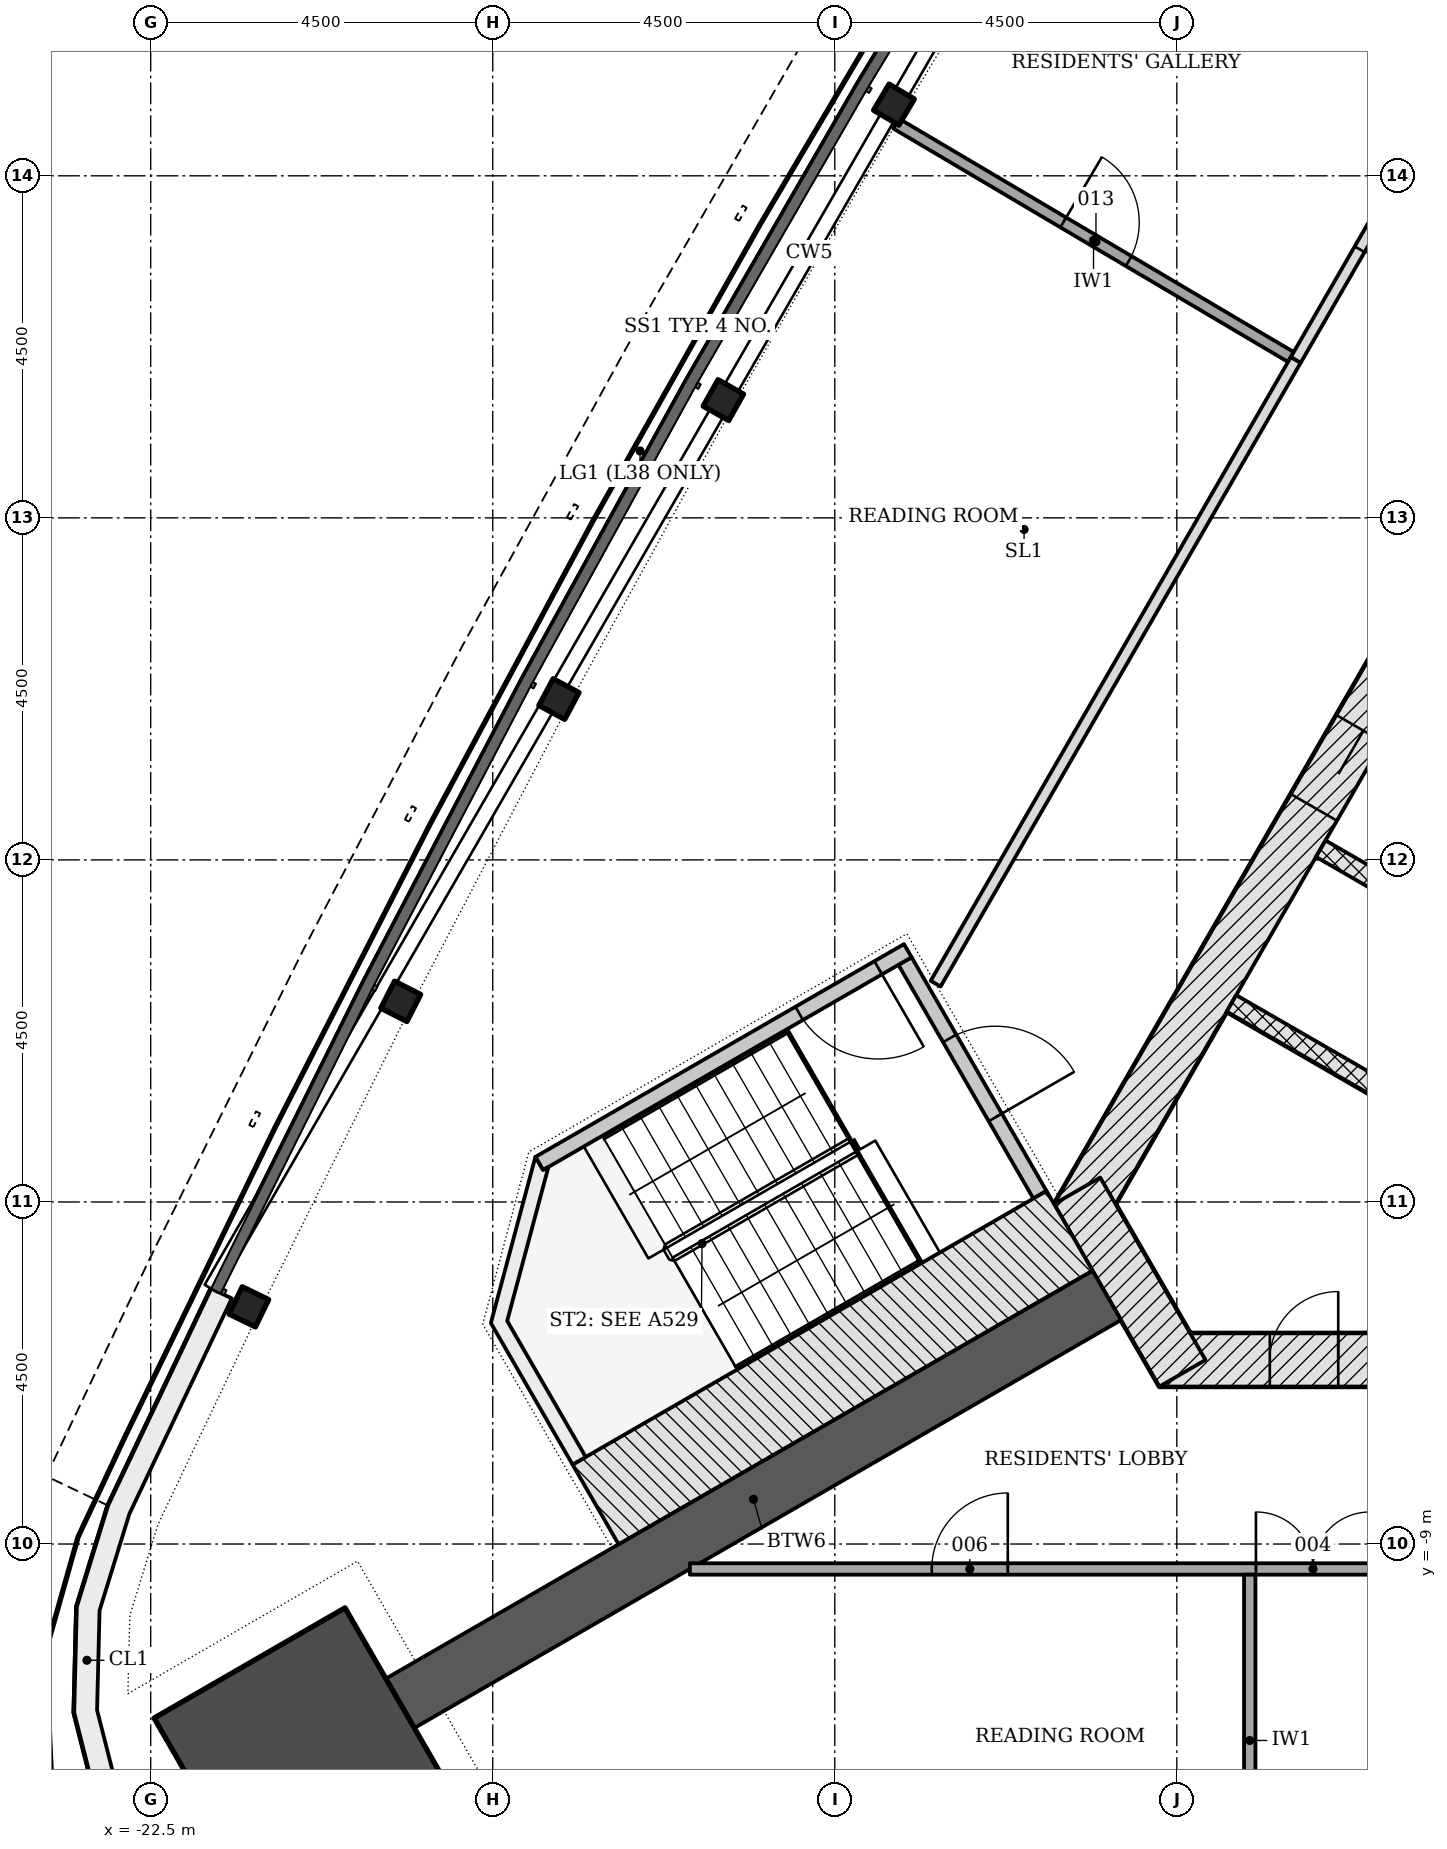
"""IFC4 building model, lengths in metres.
Left out: names, types, materials, properties, quantities, classifications, styles, units other than length and angle.
Written with IfcOpenShell. Run it as: python <this file> out.ifc"""

import sys

from ifc_helpers import new_model, si_unit, direction, frame, frame_2d, origin, origin_2d, place, context, subcontext, project, spatial, polyline, rectangle, i_section, outline, extrude, element, fill, save


model = new_model("IFC4")
c1 = context("Model", 3, precision=1e-05, world=origin(), true_north=direction((0.0, 1.0)))
c2 = subcontext(c1, "Body", "Model", "MODEL_VIEW")
j1 = project(units=[si_unit("LENGTHUNIT", "METRE"), si_unit("PLANEANGLEUNIT", "RADIAN")], contexts=[c1])
p1 = place(None, origin())
s1 = spatial("IfcSite", under=j1, at=p1, CompositionType="ELEMENT")
p2 = place(p1, origin())
s2 = spatial("IfcBuilding", under=s1, at=p2, CompositionType="ELEMENT")
p3 = place(p2, frame((0.0, 0.0, 150.9)))
s3 = spatial("IfcBuildingStorey", under=s2, at=p3, CompositionType="ELEMENT", Elevation=150.9)
p4 = place(p3, frame((-9.229, -6.578, -0.2), z_axis=(0.0, 0.0, 1.0), x_axis=(1.0, 0.0, 0.0)))
e1 = element("IfcWall", 1, at=p4, inside=s3, PredefinedType="SHEAR", context=c2, shape_type="SweptSolid", body=[
    extrude(rectangle(XDim=18.458, YDim=0.7, at=frame_2d((9.229, 0.0))), origin(), (0.0, 0.0, 1.0), 3.6),
])
p5 = place(p4, frame((6.7, 0.0, 0.2)))
e2 = element("IfcOpeningElement", 2, at=p5, cuts=e1, PredefinedType="OPENING", context=c2, shape_type="SweptSolid", body=[
    extrude(rectangle(XDim=1.0, YDim=2.1, at=frame_2d((0.5, 1.05))), frame((0.0, 0.36, 0.0), z_axis=(0.0, -1.0, 0.0), x_axis=(1.0, 0.0, 0.0)), (0.0, 0.0, 1.0), 0.72),
])
p6 = place(p4, frame((1.452, 0.0, 0.2)))
e3 = element("IfcOpeningElement", 3, at=p6, cuts=e1, PredefinedType="OPENING", context=c2, shape_type="SweptSolid", body=[
    extrude(rectangle(XDim=0.9, YDim=2.1, at=frame_2d((0.45, 1.05))), frame((0.0, 0.36, 0.0), z_axis=(0.0, -1.0, 0.0), x_axis=(1.0, 0.0, 0.0)), (0.0, 0.0, 1.0), 0.72),
])
p7 = place(p4, frame((4.45, 0.0, 0.2)))
e4 = element("IfcOpeningElement", 4, at=p7, cuts=e1, PredefinedType="OPENING", context=c2, shape_type="SweptSolid", body=[
    extrude(rectangle(XDim=1.0, YDim=2.1, at=frame_2d((0.5, 1.05))), frame((0.0, 0.36, 0.0), z_axis=(0.0, -1.0, 0.0), x_axis=(1.0, 0.0, 0.0)), (0.0, 0.0, 1.0), 0.72),
])
p8 = place(p4, frame((12.477, 0.0, 0.2)))
e5 = element("IfcOpeningElement", 5, at=p8, cuts=e1, PredefinedType="OPENING", context=c2, shape_type="SweptSolid", body=[
    extrude(rectangle(XDim=1.0, YDim=2.1, at=frame_2d((0.5, 1.05))), frame((0.0, 0.36, 0.0), z_axis=(0.0, -1.0, 0.0), x_axis=(1.0, 0.0, 0.0)), (0.0, 0.0, 1.0), 0.72),
])
p9 = place(p3, frame((-1.083, 11.281, -0.2), z_axis=(0.0, 0.0, 1.0), x_axis=(-0.500001446645, -0.866024568562, 0.0)))
e6 = element("IfcWall", 6, at=p9, inside=s3, PredefinedType="SHEAR", context=c2, shape_type="SweptSolid", body=[
    extrude(rectangle(XDim=18.458, YDim=0.7, at=frame_2d((9.229, 0.0))), origin(), (0.0, 0.0, 1.0), 3.6),
])
p10 = place(p9, frame((8.979, 0.0, 0.2)))
e7 = element("IfcOpeningElement", 7, at=p10, cuts=e6, PredefinedType="OPENING", context=c2, shape_type="SweptSolid", body=[
    extrude(rectangle(XDim=1.2, YDim=2.1, at=frame_2d((0.6, 1.05))), frame((0.0, 0.36, 0.0), z_axis=(0.0, -1.0, 0.0), x_axis=(1.0, 0.0, 0.0)), (0.0, 0.0, 1.0), 0.72),
])
p11 = place(p9, frame((11.029, 0.0, 0.2)))
e8 = element("IfcOpeningElement", 8, at=p11, cuts=e6, PredefinedType="OPENING", context=c2, shape_type="SweptSolid", body=[
    extrude(rectangle(XDim=1.2, YDim=2.1, at=frame_2d((0.6, 1.05))), frame((0.0, 0.36, 0.0), z_axis=(0.0, -1.0, 0.0), x_axis=(1.0, 0.0, 0.0)), (0.0, 0.0, 1.0), 0.72),
])
p12 = place(p3, frame((-10.311, -4.353, -0.2), z_axis=(0.0, 0.0, 1.0), x_axis=(0.500042739161, -0.866000726912, 0.0)))
e9 = element("IfcWall", 9, at=p12, inside=s3, PredefinedType="SHEAR", context=c2, shape_type="SweptSolid", body=[
    extrude(rectangle(XDim=2.771, YDim=0.7, at=frame_2d((1.386, 0.0))), origin(), (0.0, 0.0, 1.0), 3.6),
])
p13 = place(p3, frame((-9.922, -5.728, -0.2), z_axis=(0.0, 0.0, 1.0), x_axis=(-0.86602614826, -0.499998710529, 0.0)))
e10 = element("IfcWall", 10, at=p13, inside=s3, PredefinedType="SHEAR", context=c2, shape_type="SweptSolid", body=[
    extrude(rectangle(XDim=10.735, YDim=0.75, at=frame_2d((5.368, 0.0))), origin(), (0.0, 0.0, 1.0), 3.6),
])
p14 = place(p3, frame((-20.475, -11.821, -0.2), z_axis=(0.0, 0.0, 1.0), x_axis=(-0.866025403784, -0.5, 0.0)))
e11 = element("IfcColumn", 11, at=p14, inside=s3, PredefinedType="COLUMN", context=c2, shape_type="SweptSolid", body=[
    extrude(rectangle(XDim=2.9, YDim=2.9, at=origin_2d()), origin(), (0.0, 0.0, 1.0), 3.6),
])
for number, where, z_axis, x_axis in (
    (12, (-12.722, 9.936, -0.2), (0.0, 0.0, 1.0), (-0.509, -0.861, 0.0)),
    (13, (-14.966, 6.049, -0.2), (0.0, 0.0, 1.0), (-0.491, -0.871, 0.0)),
    (14, (-17.129, 2.116, -0.2), (0.0, 0.0, 1.0), (-0.473, -0.881, 0.0)),
    (15, (-19.21, -1.861, -0.2), (0.0, 0.0, 1.0), (-0.454, -0.891, 0.0)),
    (16, (-21.209, -5.88, -0.2), (0.0, 0.0, 1.0), (-0.436, -0.9, 0.0)),
):
    element("IfcColumn", number, at=place(p3, frame(where, z_axis=z_axis, x_axis=x_axis)), inside=s3, PredefinedType="COLUMN", context=c2, shape_type="SweptSolid", body=[
        extrude(i_section(OverallWidth=0.399, OverallDepth=0.386, WebThickness=0.021, FlangeThickness=0.033, FilletRadius=0.015, at=origin_2d()), origin(), (0.0, 0.0, 1.0), 3.6),
    ])
p15 = place(p3, origin())
e17 = element("IfcWall", 17, at=p15, inside=s3, PredefinedType="NOTDEFINED", context=c2, shape_type="SweptSolid", body=[
    extrude(outline(polyline([(-21.704, -5.64), (-23.061, -8.494), (-23.472, -9.826), (-23.507, -11.219), (-23.163, -12.569), (-22.466, -13.775), (-21.469, -14.748), (-20.245, -15.414), (-18.887, -15.724), (-15.736, -15.976), (-15.712, -15.677), (-18.841, -15.427), (-20.138, -15.131), (-21.289, -14.504), (-22.227, -13.589), (-22.882, -12.455), (-23.206, -11.185), (-23.173, -9.875), (-22.781, -8.604), (-21.433, -5.769), (-21.704, -5.64)])), origin(), (0.0, 0.0, 1.0), 3.3),
])
for number, where, z_axis, x_axis in (
    (18, (-7.106, 0.148, -0.2), (0.0, 0.0, 1.0), (0.866, -0.5, 0.0)),
    (19, (-8.281, -1.887, -0.2), (0.0, 0.0, 1.0), (0.866, -0.5, 0.0)),
):
    element("IfcWall", number, at=place(p3, frame(where, z_axis=z_axis, x_axis=x_axis)), inside=s3, PredefinedType="PARTITIONING", context=c2, shape_type="SweptSolid", body=[
        extrude(rectangle(XDim=2.9, YDim=0.25, at=frame_2d((1.45, 0.0))), origin(), (0.0, 0.0, 1.0), 3.6),
    ])
p16 = place(p3, frame((-12.576, -1.331, -0.2), z_axis=(0.0, 0.0, 1.0), x_axis=(0.499970499736, -0.8660424351, 0.0)))
e20 = element("IfcWall", 20, at=p16, inside=s3, PredefinedType="SHEAR", context=c2, shape_type="SweptSolid", body=[
    extrude(rectangle(XDim=3.55, YDim=0.2, at=frame_2d((1.775, 0.0))), origin(), (0.0, 0.0, 1.0), 3.6),
])
p17 = place(p16, frame((1.175, 0.0, 0.2)))
e21 = element("IfcOpeningElement", 21, at=p17, cuts=e20, PredefinedType="OPENING", context=c2, shape_type="SweptSolid", body=[
    extrude(rectangle(XDim=1.2, YDim=2.1, at=frame_2d((0.6, 1.05))), frame((0.0, 0.11, 0.0), z_axis=(0.0, -1.0, 0.0), x_axis=(1.0, 0.0, 0.0)), (0.0, 0.0, 1.0), 0.22),
])
p18 = place(p3, frame((-12.539, -1.194, -0.2), z_axis=(0.0, 0.0, 1.0), x_axis=(-0.866045472092, -0.499965239061, 0.0)))
e22 = element("IfcWall", 22, at=p18, inside=s3, PredefinedType="SHEAR", context=c2, shape_type="SweptSolid", body=[
    extrude(rectangle(XDim=5.6, YDim=0.2, at=frame_2d((2.8, 0.0))), origin(), (0.0, 0.0, 1.0), 3.6),
])
p19 = place(p18, frame((0.45, 0.0, 0.2)))
e23 = element("IfcOpeningElement", 23, at=p19, cuts=e22, PredefinedType="OPENING", context=c2, shape_type="SweptSolid", body=[
    extrude(rectangle(XDim=1.2, YDim=2.1, at=frame_2d((0.6, 1.05))), frame((0.0, 0.11, 0.0), z_axis=(0.0, -1.0, 0.0), x_axis=(1.0, 0.0, 0.0)), (0.0, 0.0, 1.0), 0.22),
])
p20 = place(p3, frame((-10.412, -4.879, -0.2), z_axis=(0.0, 0.0, 1.0), x_axis=(-0.866026919366, -0.499997374926, 0.0)))
e24 = element("IfcWall", 24, at=p20, inside=s3, PredefinedType="SHEAR", context=c2, shape_type="SweptSolid", body=[
    extrude(rectangle(XDim=7.2, YDim=1.211, at=frame_2d((3.6, 0.0))), origin(), (0.0, 0.0, 1.0), 3.6),
])
p21 = place(p3, frame((0.0, 0.0, -0.2)))
e25 = element("IfcWall", 25, at=p21, inside=s3, PredefinedType="SHEAR", context=c2, shape_type="SweptSolid", body=[
    extrude(outline(polyline([(-17.439, -3.907), (-18.025, -6.093), (-16.95, -7.955), (-16.777, -7.855), (-17.81, -6.065), (-17.267, -4.039), (-17.339, -4.081), (-17.339, -4.081), (-17.339, -4.081), (-17.339, -4.081), (-17.339, -4.081), (-17.339, -4.081), (-17.339, -4.081), (-17.339, -4.081), (-17.339, -4.081), (-17.339, -4.081), (-17.339, -4.081), (-17.339, -4.081), (-17.339, -4.081), (-17.339, -4.081), (-17.339, -4.081), (-17.339, -4.081), (-17.339, -4.081), (-17.439, -3.907)])), origin(), (0.0, 0.0, 1.0), 3.6),
])
p22 = place(p3, frame((-15.407, -9.328, 0.0), z_axis=(0.0, 0.0, 1.0), x_axis=(1.0, 0.0, 0.0)))
e26 = element("IfcWall", 26, at=p22, inside=s3, PredefinedType="PARTITIONING", context=c2, shape_type="SweptSolid", body=[
    extrude(rectangle(XDim=9.079, YDim=0.15, at=frame_2d((4.54, 0.0))), origin(), (0.0, 0.0, 1.0), 2.847),
])
p23 = place(p22, frame((7.448, 0.0, 0.0)))
e27 = element("IfcOpeningElement", 27, at=p23, cuts=e26, PredefinedType="OPENING", context=c2, shape_type="SweptSolid", body=[
    extrude(rectangle(XDim=1.5, YDim=2.1, at=frame_2d((0.75, 1.05))), frame((0.0, 0.085, 0.0), z_axis=(0.0, -1.0, 0.0), x_axis=(1.0, 0.0, 0.0)), (0.0, 0.0, 1.0), 0.17),
])
p24 = place(p22, frame((3.183, 0.0, 0.0)))
e28 = element("IfcOpeningElement", 28, at=p24, cuts=e26, PredefinedType="OPENING", context=c2, shape_type="SweptSolid", body=[
    extrude(rectangle(XDim=1.0, YDim=2.1, at=frame_2d((0.5, 1.05))), frame((0.0, 0.085, 0.0), z_axis=(0.0, -1.0, 0.0), x_axis=(1.0, 0.0, 0.0)), (0.0, 0.0, 1.0), 0.17),
])
p25 = place(p3, frame((-8.041, -9.403, 0.0), z_axis=(0.0, 0.0, 1.0), x_axis=(0.0, -1.0, 0.0)))
e29 = element("IfcWall", 29, at=p25, inside=s3, PredefinedType="PARTITIONING", context=c2, shape_type="SweptSolid", body=[
    extrude(rectangle(XDim=4.363, YDim=0.15, at=frame_2d((2.181, 0.0))), origin(), (0.0, 0.0, 1.0), 3.4),
])
p26 = place(p3, frame((-7.435, 6.578, 0.0), z_axis=(0.0, 0.0, 1.0), x_axis=(-0.499998996204, -0.866025983326, 0.0)))
e30 = element("IfcWall", 30, at=p26, inside=s3, PredefinedType="PARTITIONING", context=c2, shape_type="SweptSolid", body=[
    extrude(rectangle(XDim=9.476, YDim=0.15, at=frame_2d((4.738, 0.0))), origin(), (0.0, 0.0, 1.0), 2.847),
])
p27 = place(p3, frame((-10.374, 13.526, 0.0), z_axis=(0.0, 0.0, 1.0), x_axis=(0.85006997005, -0.526669769418, 0.0)))
e31 = element("IfcWall", 31, at=p27, inside=s3, PredefinedType="PARTITIONING", context=c2, shape_type="SweptSolid", body=[
    extrude(rectangle(XDim=5.947, YDim=0.15, at=frame_2d((2.973, 0.0))), origin(), (0.0, 0.0, 1.0), 3.4),
])
p28 = place(p27, frame((2.511, 0.0, 0.0)))
e32 = element("IfcOpeningElement", 32, at=p28, cuts=e31, PredefinedType="OPENING", context=c2, shape_type="SweptSolid", body=[
    extrude(rectangle(XDim=1.0, YDim=2.1, at=frame_2d((0.5, 1.05))), frame((0.0, 0.085, 0.0), z_axis=(0.0, -1.0, 0.0), x_axis=(1.0, 0.0, 0.0)), (0.0, 0.0, 1.0), 0.17),
])
p29 = place(p3, frame((-12.693, 9.687, 0.0), z_axis=(0.0, 0.0, 1.0), x_axis=(0.860795979621, -0.508950175821, 0.0)))
e33 = element("IfcWall", 33, at=p29, inside=s3, PredefinedType="PARTITIONING", context=c2, shape_type="SweptSolid", body=[
    extrude(rectangle(XDim=6.033, YDim=0.15, at=frame_2d((3.016, 0.0))), origin(), (0.0, 0.0, 1.0), 3.4),
])
p30 = place(p29, frame((2.554, 0.0, 0.0)))
e34 = element("IfcOpeningElement", 34, at=p30, cuts=e33, PredefinedType="OPENING", context=c2, shape_type="SweptSolid", body=[
    extrude(rectangle(XDim=1.0, YDim=2.1, at=frame_2d((0.5, 1.05))), frame((0.0, 0.085, 0.0), z_axis=(0.0, -1.0, 0.0), x_axis=(1.0, 0.0, 0.0)), (0.0, 0.0, 1.0), 0.17),
])
p31 = place(p3, frame((-5.255, 10.355, 0.0), z_axis=(0.0, 0.0, 1.0), x_axis=(-0.499980937175, -0.866036409432, 0.0)))
e35 = element("IfcWall", 35, at=p31, inside=s3, PredefinedType="PARTITIONING", context=c2, shape_type="SweptSolid", body=[
    extrude(rectangle(XDim=4.361, YDim=0.15, at=frame_2d((2.18, 0.0))), origin(), (0.0, 0.0, 1.0), 2.847),
])
p32 = place(p31, frame((1.68, 0.0, 0.0)))
e36 = element("IfcOpeningElement", 36, at=p32, cuts=e35, PredefinedType="OPENING", context=c2, shape_type="SweptSolid", body=[
    extrude(rectangle(XDim=1.0, YDim=2.1, at=frame_2d((0.5, 1.05))), frame((0.0, 0.085, 0.0), z_axis=(0.0, -1.0, 0.0), x_axis=(1.0, 0.0, 0.0)), (0.0, 0.0, 1.0), 0.17),
])
p33 = place(p11, origin())
e37 = element("IfcDoor", 37, at=p33, inside=s3, OperationType="DOUBLE_DOOR_SLIDING", PredefinedType="DOOR", context=c2, shape_type="SweptSolid", body=[
    extrude(rectangle(XDim=1.2, YDim=2.1, at=frame_2d((0.6, 1.05))), frame((0.0, 0.025, 0.0), z_axis=(0.0, -1.0, 0.0), x_axis=(1.0, 0.0, 0.0)), (0.0, 0.0, 1.0), 0.05),
])
fill(e8, e37)
p34 = place(p6, origin())
e38 = element("IfcDoor", 38, at=p34, inside=s3, OperationType="SINGLE_SWING_RIGHT", PredefinedType="DOOR", context=c2, shape_type="SweptSolid", body=[
    extrude(rectangle(XDim=0.9, YDim=2.1, at=frame_2d((0.45, 1.05))), frame((0.0, 0.075, 0.0), z_axis=(0.0, -1.0, 0.0), x_axis=(1.0, 0.0, 0.0)), (0.0, 0.0, 1.0), 0.15),
])
fill(e3, e38)
p35 = place(p17, origin())
e39 = element("IfcDoor", 39, at=p35, inside=s3, OperationType="SINGLE_SWING_RIGHT", PredefinedType="DOOR", context=c2, shape_type="SweptSolid", body=[
    extrude(rectangle(XDim=1.2, YDim=2.1, at=frame_2d((0.6, 1.05))), frame((0.0, 0.025, 0.0), z_axis=(0.0, -1.0, 0.0), x_axis=(1.0, 0.0, 0.0)), (0.0, 0.0, 1.0), 0.05),
])
fill(e21, e39)
p36 = place(p19, origin())
e40 = element("IfcDoor", 40, at=p36, inside=s3, OperationType="SINGLE_SWING_LEFT", PredefinedType="DOOR", context=c2, shape_type="SweptSolid", body=[
    extrude(rectangle(XDim=1.2, YDim=2.1, at=frame_2d((0.6, 1.05))), frame((0.0, 0.025, 0.0), z_axis=(0.0, -1.0, 0.0), x_axis=(1.0, 0.0, 0.0)), (0.0, 0.0, 1.0), 0.05),
])
fill(e23, e40)
p37 = place(p23, origin())
e41 = element("IfcDoor", 41, at=p37, inside=s3, OperationType="DOUBLE_DOOR_SINGLE_SWING", PredefinedType="DOOR", context=c2, shape_type="SweptSolid", body=[
    extrude(rectangle(XDim=1.5, YDim=2.1, at=frame_2d((0.75, 1.05))), frame((0.0, 0.025, 0.0), z_axis=(0.0, -1.0, 0.0), x_axis=(1.0, 0.0, 0.0)), (0.0, 0.0, 1.0), 0.05),
])
fill(e27, e41)
p38 = place(p24, origin())
e42 = element("IfcDoor", 42, at=p38, inside=s3, OperationType="SINGLE_SWING_RIGHT", PredefinedType="DOOR", context=c2, shape_type="SweptSolid", body=[
    extrude(rectangle(XDim=1.0, YDim=2.1, at=frame_2d((0.5, 1.05))), frame((0.0, 0.025, 0.0), z_axis=(0.0, -1.0, 0.0), x_axis=(1.0, 0.0, 0.0)), (0.0, 0.0, 1.0), 0.05),
])
fill(e28, e42)
p39 = place(p32, origin())
e43 = element("IfcDoor", 43, at=p39, inside=s3, OperationType="SINGLE_SWING_LEFT", PredefinedType="DOOR", context=c2, shape_type="SweptSolid", body=[
    extrude(rectangle(XDim=1.0, YDim=2.1, at=frame_2d((0.5, 1.05))), frame((0.0, 0.025, 0.0), z_axis=(0.0, -1.0, 0.0), x_axis=(1.0, 0.0, 0.0)), (0.0, 0.0, 1.0), 0.05),
])
fill(e36, e43)
p40 = place(p30, origin())
e44 = element("IfcDoor", 44, at=p40, inside=s3, OperationType="SINGLE_SWING_LEFT", PredefinedType="DOOR", context=c2, shape_type="SweptSolid", body=[
    extrude(rectangle(XDim=1.0, YDim=2.1, at=frame_2d((0.5, 1.05))), frame((0.0, 0.025, 0.0), z_axis=(0.0, -1.0, 0.0), x_axis=(1.0, 0.0, 0.0)), (0.0, 0.0, 1.0), 0.05),
])
fill(e34, e44)
save(model, sys.argv[1])
